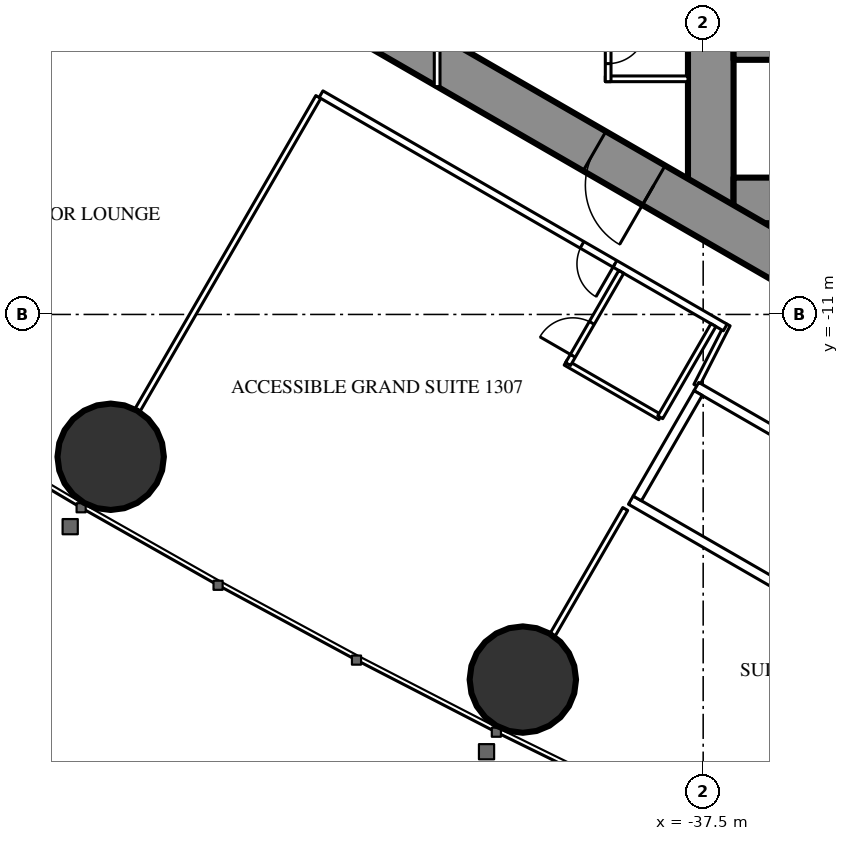
"""IFC4 building model, lengths in metres.
Left out: names, types, materials, properties, quantities, classifications, styles, units other than length and angle.
Written with IfcOpenShell. Run it as: python <this file> out.ifc"""

import sys

from ifc_helpers import new_model, si_unit, direction, frame, frame_2d, origin, origin_2d, place, context, subcontext, project, spatial, rectangle, hollow_circle, extrude, element, fill, save


model = new_model("IFC4")
c1 = context("Model", 3, precision=1e-05, world=origin(), true_north=direction((0.0, 1.0)))
c2 = subcontext(c1, "Body", "Model", "MODEL_VIEW")
j1 = project(units=[si_unit("LENGTHUNIT", "METRE"), si_unit("PLANEANGLEUNIT", "RADIAN")], contexts=[c1])
p1 = place(None, origin())
s1 = spatial("IfcSite", under=j1, at=p1, CompositionType="ELEMENT")
p2 = place(p1, origin())
s2 = spatial("IfcBuilding", under=s1, at=p2, CompositionType="ELEMENT")
p3 = place(p2, frame((0.0, 0.0, 53.0)))
s3 = spatial("IfcBuildingStorey", under=s2, at=p3, CompositionType="ELEMENT", Elevation=53.0)
for number, where, z_axis, x_axis in (
    (1, (-53.09, -14.745, 0.0), (0.0, 0.0, 1.0), (1.0, 0.0, 0.0)),
    (2, (-42.245, -20.607, 0.0), (0.0, 0.0, 1.0), (1.0, 0.0, 0.0)),
):
    element("IfcColumn", number, at=place(p3, frame(where, z_axis=z_axis, x_axis=x_axis)), inside=s3, PredefinedType="COLUMN", context=c2, shape_type="SweptSolid", body=[
        extrude(hollow_circle(Radius=1.4, WallThickness=0.12, at=origin_2d()), origin(), (0.0, 0.0, 1.0), 3.5),
    ])
p4 = place(p3, frame((-37.3, 8.6, 0.0), z_axis=(0.0, 0.0, 1.0), x_axis=(0.0, -1.0, 0.0)))
e3 = element("IfcWall", 3, at=p4, inside=s3, PredefinedType="SHEAR", context=c2, shape_type="SweptSolid", body=[
    extrude(rectangle(XDim=17.2, YDim=1.2, at=frame_2d((8.6, 0.0))), origin(), (0.0, 0.0, 1.0), 3.5),
])
p5 = place(p4, frame((7.7, 0.0, 0.0)))
e4 = element("IfcOpeningElement", 4, at=p5, cuts=e3, PredefinedType="OPENING", context=c2, shape_type="SweptSolid", body=[
    extrude(rectangle(XDim=1.8, YDim=2.2, at=frame_2d((0.9, 1.1))), frame((0.0, 0.61, 0.0), z_axis=(0.0, -1.0, 0.0), x_axis=(1.0, 0.0, 0.0)), (0.0, 0.0, 1.0), 1.22),
])
p6 = place(p3, frame((-28.3, -8.0, 0.0), z_axis=(0.0, 0.0, 1.0), x_axis=(-1.0, 0.0, 0.0)))
e5 = element("IfcWall", 5, at=p6, inside=s3, PredefinedType="SHEAR", context=c2, shape_type="SweptSolid", body=[
    extrude(rectangle(XDim=8.4, YDim=1.2, at=frame_2d((4.2, 0.0))), origin(), (0.0, 0.0, 1.0), 3.5),
])
p7 = place(p6, frame((0.25, 0.0, 0.0)))
e6 = element("IfcOpeningElement", 6, at=p7, cuts=e5, PredefinedType="OPENING", context=c2, shape_type="SweptSolid", body=[
    extrude(rectangle(XDim=1.0, YDim=2.2, at=frame_2d((0.5, 1.1))), frame((0.0, 0.61, 0.0), z_axis=(0.0, -1.0, 0.0), x_axis=(1.0, 0.0, 0.0)), (0.0, 0.0, 1.0), 1.22),
])
p8 = place(p3, frame((-28.3, -4.15, 0.0), z_axis=(0.0, 0.0, 1.0), x_axis=(-1.0, 0.0, 0.0)))
e7 = element("IfcWall", 7, at=p8, inside=s3, PredefinedType="SHEAR", context=c2, shape_type="SweptSolid", body=[
    extrude(rectangle(XDim=8.4, YDim=0.3, at=frame_2d((4.2, 0.0))), origin(), (0.0, 0.0, 1.0), 3.5),
])
p9 = place(p3, frame((-27.2, -14.3, 0.0), z_axis=(0.0, 0.0, 1.0), x_axis=(-0.866024021859, 0.500002393557, 0.0)))
e8 = element("IfcWall", 8, at=p9, inside=s3, PredefinedType="SHEAR", context=c2, shape_type="SweptSolid", body=[
    extrude(rectangle(XDim=27.907, YDim=1.2, at=frame_2d((13.954, 0.0))), origin(), (0.0, 0.0, 1.0), 3.5),
])
p10 = place(p9, frame((4.6, 0.0, 0.0)))
e9 = element("IfcOpeningElement", 9, at=p10, cuts=e8, PredefinedType="OPENING", context=c2, shape_type="SweptSolid", body=[
    extrude(rectangle(XDim=1.0, YDim=2.2, at=frame_2d((0.5, 1.1))), frame((0.0, 0.61, 0.0), z_axis=(0.0, -1.0, 0.0), x_axis=(1.0, 0.0, 0.0)), (0.0, 0.0, 1.0), 1.22),
])
p11 = place(p9, frame((13.395, 0.0, 0.0)))
e10 = element("IfcOpeningElement", 10, at=p11, cuts=e8, PredefinedType="OPENING", context=c2, shape_type="SweptSolid", body=[
    extrude(rectangle(XDim=1.8, YDim=2.2, at=frame_2d((0.9, 1.1))), frame((0.0, 0.61, 0.0), z_axis=(0.0, -1.0, 0.0), x_axis=(1.0, 0.0, 0.0)), (0.0, 0.0, 1.0), 1.22),
])
p12 = place(p3, frame((-47.627, -5.278, 0.0), z_axis=(0.0, 0.0, 1.0), x_axis=(-0.500009844318, -0.86601972009, 0.0)))
e11 = element("IfcWall", 11, at=p12, inside=s3, PredefinedType="PARTITIONING", context=c2, shape_type="SweptSolid", body=[
    extrude(rectangle(XDim=9.51, YDim=0.15, at=frame_2d((4.755, 0.0))), origin(), (0.0, 0.0, 1.0), 2.25),
])
p13 = place(p3, frame((-39.551, -16.118, 0.0), z_axis=(0.0, 0.0, 1.0), x_axis=(-0.499986503906, -0.866033195618, 0.0)))
e12 = element("IfcWall", 12, at=p13, inside=s3, PredefinedType="PARTITIONING", context=c2, shape_type="SweptSolid", body=[
    extrude(rectangle(XDim=3.815, YDim=0.15, at=frame_2d((1.907, 0.0))), origin(), (0.0, 0.0, 1.0), 3.25),
])
p14 = place(p3, frame((-36.857, -11.265, 0.0), z_axis=(0.0, 0.0, 1.0), x_axis=(-0.454225294761, -0.890886851176, 0.0)))
e13 = element("IfcWall", 13, at=p14, inside=s3, PredefinedType="PARTITIONING", context=c2, shape_type="SweptSolid", body=[
    extrude(rectangle(XDim=1.807, YDim=0.15, at=frame_2d((0.904, 0.0))), origin(), (0.0, 0.0, 1.0), 3.25),
])
p15 = place(p3, frame((-36.92, -11.344, 0.0), z_axis=(0.0, 0.0, 1.0), x_axis=(-0.866025017052, 0.500000669839, 0.0)))
e14 = element("IfcWall", 14, at=p15, inside=s3, PredefinedType="PARTITIONING", context=c2, shape_type="SweptSolid", body=[
    extrude(rectangle(XDim=12.28, YDim=0.2, at=frame_2d((6.14, 0.0))), origin(), (0.0, 0.0, 1.0), 3.25),
])
p16 = place(p15, frame((3.35, 0.0, 0.0)))
e15 = element("IfcOpeningElement", 15, at=p16, cuts=e14, PredefinedType="OPENING", context=c2, shape_type="SweptSolid", body=[
    extrude(rectangle(XDim=1.0, YDim=2.2, at=frame_2d((0.5, 1.1))), frame((0.0, 0.11, 0.0), z_axis=(0.0, -1.0, 0.0), x_axis=(1.0, 0.0, 0.0)), (0.0, 0.0, 1.0), 0.22),
])
p17 = place(p3, frame((-38.63, -13.705, 0.0), z_axis=(0.0, 0.0, 1.0), x_axis=(-0.866018712932, 0.500011588718, 0.0)))
e16 = element("IfcWall", 16, at=p17, inside=s3, PredefinedType="PARTITIONING", context=c2, shape_type="SweptSolid", body=[
    extrude(rectangle(XDim=2.875, YDim=0.15, at=frame_2d((1.438, 0.0))), origin(), (0.0, 0.0, 1.0), 3.25),
])
p18 = place(p3, frame((-39.655, -9.88, 0.0), z_axis=(0.0, 0.0, 1.0), x_axis=(-0.500049511043, -0.865996816683, 0.0)))
e17 = element("IfcWall", 17, at=p18, inside=s3, PredefinedType="PARTITIONING", context=c2, shape_type="SweptSolid", body=[
    extrude(rectangle(XDim=2.8, YDim=0.15, at=frame_2d((1.4, 0.0))), origin(), (0.0, 0.0, 1.0), 3.25),
])
p19 = place(p18, frame((1.55, 0.0, 0.0)))
e18 = element("IfcOpeningElement", 18, at=p19, cuts=e17, PredefinedType="OPENING", context=c2, shape_type="SweptSolid", body=[
    extrude(rectangle(XDim=1.0, YDim=2.2, at=frame_2d((0.5, 1.1))), frame((0.0, 0.085, 0.0), z_axis=(0.0, -1.0, 0.0), x_axis=(1.0, 0.0, 0.0)), (0.0, 0.0, 1.0), 0.17),
])
p20 = place(p3, frame((-37.23, -11.281, 0.0), z_axis=(0.0, 0.0, 1.0), x_axis=(-0.500049511043, -0.865996816683, 0.0)))
e19 = element("IfcWall", 19, at=p20, inside=s3, PredefinedType="PARTITIONING", context=c2, shape_type="SweptSolid", body=[
    extrude(rectangle(XDim=2.8, YDim=0.15, at=frame_2d((1.4, 0.0))), origin(), (0.0, 0.0, 1.0), 3.25),
])
p21 = place(p3, frame((-37.9, -4.8, 0.0), z_axis=(0.0, 0.0, 1.0), x_axis=(-1.0, 0.0, 0.0)))
e20 = element("IfcWall", 20, at=p21, inside=s3, PredefinedType="PARTITIONING", context=c2, shape_type="SweptSolid", body=[
    extrude(rectangle(XDim=2.175, YDim=0.15, at=frame_2d((1.087, 0.0))), origin(), (0.0, 0.0, 1.0), 3.25),
])
p22 = place(p3, frame((-40.0, -2.925, 0.0), z_axis=(0.0, 0.0, 1.0), x_axis=(0.0, -1.0, 0.0)))
e21 = element("IfcWall", 21, at=p22, inside=s3, PredefinedType="PARTITIONING", context=c2, shape_type="SweptSolid", body=[
    extrude(rectangle(XDim=1.95, YDim=0.15, at=frame_2d((0.975, 0.0))), origin(), (0.0, 0.0, 1.0), 3.25),
])
p23 = place(p22, frame((0.475, 0.0, 0.0)))
e22 = element("IfcOpeningElement", 22, at=p23, cuts=e21, PredefinedType="OPENING", context=c2, shape_type="SweptSolid", body=[
    extrude(rectangle(XDim=1.0, YDim=2.2, at=frame_2d((0.5, 1.1))), frame((0.0, 0.085, 0.0), z_axis=(0.0, -1.0, 0.0), x_axis=(1.0, 0.0, 0.0)), (0.0, 0.0, 1.0), 0.17),
])
p24 = place(p3, frame((-44.5, 5.005, 0.0), z_axis=(0.0, 0.0, 1.0), x_axis=(0.0, -1.0, 0.0)))
e23 = element("IfcWall", 23, at=p24, inside=s3, PredefinedType="PARTITIONING", context=c2, shape_type="SweptSolid", body=[
    extrude(rectangle(XDim=10.009, YDim=0.15, at=frame_2d((5.005, 0.0))), origin(), (0.0, 0.0, 1.0), 2.45),
])
p25 = place(p24, frame((2.002, 0.0, 0.0)))
e24 = element("IfcOpeningElement", 24, at=p25, cuts=e23, PredefinedType="OPENING", context=c2, shape_type="SweptSolid", body=[
    extrude(rectangle(XDim=1.0, YDim=2.2, at=frame_2d((0.5, 1.1))), frame((0.0, 0.085, 0.0), z_axis=(0.0, -1.0, 0.0), x_axis=(1.0, 0.0, 0.0)), (0.0, 0.0, 1.0), 0.17),
])
p26 = place(p24, frame((7.007, 0.0, 0.0)))
e25 = element("IfcOpeningElement", 25, at=p26, cuts=e23, PredefinedType="OPENING", context=c2, shape_type="SweptSolid", body=[
    extrude(rectangle(XDim=1.0, YDim=2.2, at=frame_2d((0.5, 1.1))), frame((0.0, 0.085, 0.0), z_axis=(0.0, -1.0, 0.0), x_axis=(1.0, 0.0, 0.0)), (0.0, 0.0, 1.0), 0.17),
])
p27 = place(p3, frame((-33.696, -15.197, 0.0), z_axis=(0.0, 0.0, 1.0), x_axis=(-0.865976953817, 0.500083908417, 0.0)))
e26 = element("IfcWall", 26, at=p27, inside=s3, PredefinedType="PARTITIONING", context=c2, shape_type="SweptSolid", body=[
    extrude(rectangle(XDim=4.599, YDim=0.25, at=frame_2d((2.3, 0.0))), origin(), (0.0, 0.0, 1.0), 3.25),
])
p28 = place(p3, frame((-35.42, -18.186, 0.0), z_axis=(0.0, 0.0, 1.0), x_axis=(-0.865990227814, 0.50006092162, 0.0)))
e27 = element("IfcWall", 27, at=p28, inside=s3, PredefinedType="PARTITIONING", context=c2, shape_type="SweptSolid", body=[
    extrude(rectangle(XDim=4.6, YDim=0.25, at=frame_2d((2.3, 0.0))), origin(), (0.0, 0.0, 1.0), 3.25),
])
p29 = place(p3, frame((-37.633, -13.068, 0.0), z_axis=(0.0, 0.0, 1.0), x_axis=(-0.499872130319, -0.866099216793, 0.0)))
e28 = element("IfcWall", 28, at=p29, inside=s3, PredefinedType="PARTITIONING", context=c2, shape_type="SweptSolid", body=[
    extrude(rectangle(XDim=3.2, YDim=0.25, at=frame_2d((1.6, 0.0))), origin(), (0.0, 0.0, 1.0), 3.25),
])
p30 = place(p19, origin())
e29 = element("IfcDoor", 29, at=p30, inside=s3, OperationType="SINGLE_SWING_RIGHT", PredefinedType="DOOR", context=c2, shape_type="SweptSolid", body=[
    extrude(rectangle(XDim=1.0, YDim=2.2, at=frame_2d((0.5, 1.1))), frame((0.0, 0.025, 0.0), z_axis=(0.0, -1.0, 0.0), x_axis=(1.0, 0.0, 0.0)), (0.0, 0.0, 1.0), 0.05),
])
fill(e18, e29)
p31 = place(p16, origin())
e30 = element("IfcDoor", 30, at=p31, inside=s3, OperationType="SINGLE_SWING_LEFT", PredefinedType="DOOR", context=c2, shape_type="SweptSolid", body=[
    extrude(rectangle(XDim=1.0, YDim=2.2, at=frame_2d((0.5, 1.1))), frame((0.0, 0.025, 0.0), z_axis=(0.0, -1.0, 0.0), x_axis=(1.0, 0.0, 0.0)), (0.0, 0.0, 1.0), 0.05),
])
fill(e15, e30)
p32 = place(p23, origin())
e31 = element("IfcDoor", 31, at=p32, inside=s3, OperationType="SINGLE_SWING_LEFT", PredefinedType="DOOR", context=c2, shape_type="SweptSolid", body=[
    extrude(rectangle(XDim=1.0, YDim=2.2, at=frame_2d((0.5, 1.1))), frame((0.0, 0.025, 0.0), z_axis=(0.0, -1.0, 0.0), x_axis=(1.0, 0.0, 0.0)), (0.0, 0.0, 1.0), 0.05),
])
fill(e22, e31)
p33 = place(p11, origin())
e32 = element("IfcDoor", 32, at=p33, inside=s3, OperationType="DOUBLE_DOOR_SINGLE_SWING", PredefinedType="DOOR", context=c2, shape_type="SweptSolid", body=[
    extrude(rectangle(XDim=1.8, YDim=2.2, at=frame_2d((0.9, 1.1))), frame((0.0, 0.025, 0.0), z_axis=(0.0, -1.0, 0.0), x_axis=(1.0, 0.0, 0.0)), (0.0, 0.0, 1.0), 0.05),
])
fill(e10, e32)
save(model, sys.argv[1])
